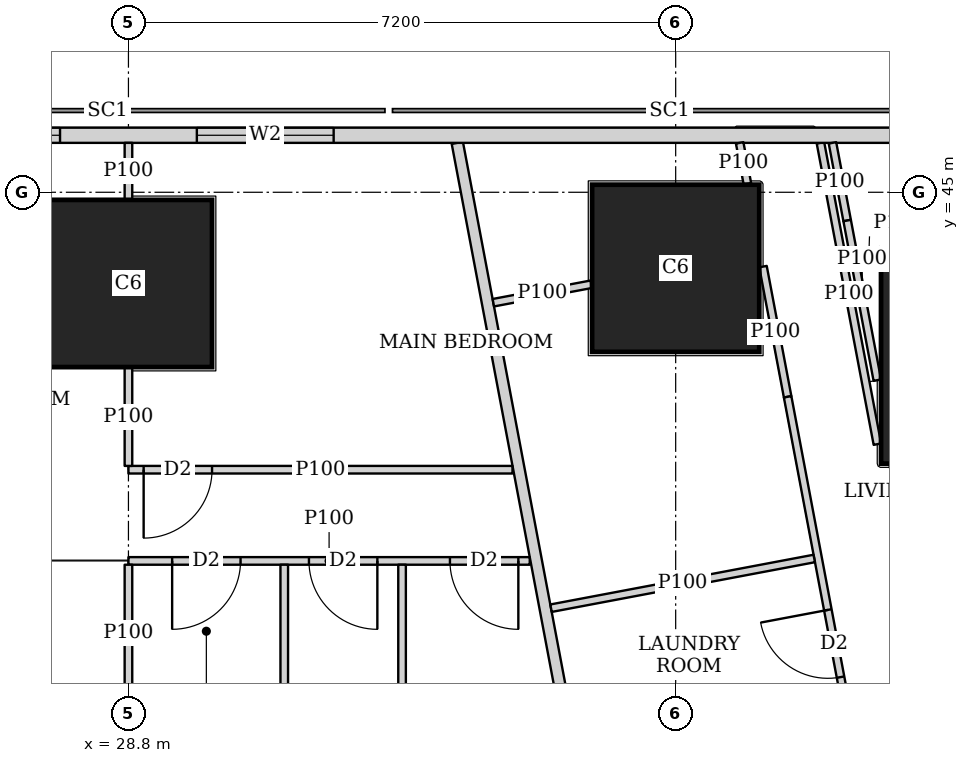
"""IFC4 building model, lengths in metres.
Left out: names, types, materials, properties, quantities, classifications, styles, units other than length and angle.
Written with IfcOpenShell. Run it as: python <this file> out.ifc"""

import sys

from ifc_helpers import new_model, si_unit, direction, frame, frame_2d, origin, origin_2d, place, context, subcontext, project, spatial, rectangle, extrude, element, fill, save


model = new_model("IFC4")
c1 = context("Model", 3, precision=1e-05, world=origin(), true_north=direction((0.0, 1.0)))
c2 = subcontext(c1, "Body", "Model", "MODEL_VIEW")
j1 = project(units=[si_unit("LENGTHUNIT", "METRE"), si_unit("PLANEANGLEUNIT", "RADIAN")], contexts=[c1])
p1 = place(None, origin())
s1 = spatial("IfcSite", under=j1, at=p1, CompositionType="ELEMENT")
p2 = place(p1, origin())
s2 = spatial("IfcBuilding", under=s1, at=p2, CompositionType="ELEMENT")
p3 = place(p2, frame((0.0, 0.0, 89.15)))
s3 = spatial("IfcBuildingStorey", under=s2, at=p3, CompositionType="ELEMENT", Elevation=89.15)
p4 = place(p3, frame((40.102, 42.83, 0.0), z_axis=(0.0, 0.0, 1.0), x_axis=(1.0, 0.0, 0.0)))
e1 = element("IfcColumn", 1, at=p4, inside=s3, PredefinedType="COLUMN", context=c2, shape_type="SweptSolid", body=[
    extrude(rectangle(XDim=2.8, YDim=2.8, at=origin_2d()), origin(), (0.0, 0.0, 1.0), 3.75),
])
for number, where, z_axis, x_axis in (
    (2, (28.8, 43.8, 0.0), (0.0, 0.0, 1.0), (1.0, 0.0, 0.0)),
    (3, (36.0, 44.0, 0.0), (0.0, 0.0, 1.0), (1.0, 0.0, 0.0)),
):
    element("IfcColumn", number, at=place(p3, frame(where, z_axis=z_axis, x_axis=x_axis)), inside=s3, PredefinedType="COLUMN", context=c2, shape_type="SweptSolid", body=[
        extrude(rectangle(XDim=2.2, YDim=2.2, at=origin_2d()), origin(), (0.0, 0.0, 1.0), 3.75),
    ])
p5 = place(p3, frame((40.106, 45.75, 0.0), z_axis=(0.0, 0.0, 1.0), x_axis=(-1.0, 0.0, 0.0)))
e4 = element("IfcWall", 4, at=p5, inside=s3, PredefinedType="SOLIDWALL", context=c2, shape_type="SweptSolid", body=[
    extrude(rectangle(XDim=37.943, YDim=0.2, at=frame_2d((18.971, 0.0))), origin(), (0.0, 0.0, 1.0), 3.5),
])
p6 = place(p5, frame((8.606, 0.0, 0.9)))
e5 = element("IfcOpeningElement", 5, at=p6, cuts=e4, PredefinedType="OPENING", context=c2, shape_type="SweptSolid", body=[
    extrude(rectangle(XDim=1.8, YDim=1.5, at=frame_2d((0.9, 0.75))), frame((0.0, 0.11, 0.0), z_axis=(0.0, -1.0, 0.0), x_axis=(1.0, 0.0, 0.0)), (0.0, 0.0, 1.0), 0.22),
])
p7 = place(p5, frame((12.206, 0.0, 0.9)))
e6 = element("IfcOpeningElement", 6, at=p7, cuts=e4, PredefinedType="OPENING", context=c2, shape_type="SweptSolid", body=[
    extrude(rectangle(XDim=1.8, YDim=1.5, at=frame_2d((0.9, 0.75))), frame((0.0, 0.11, 0.0), z_axis=(0.0, -1.0, 0.0), x_axis=(1.0, 0.0, 0.0)), (0.0, 0.0, 1.0), 0.22),
])
p8 = place(p5, frame((15.806, 0.0, 0.9)))
e7 = element("IfcOpeningElement", 7, at=p8, cuts=e4, PredefinedType="OPENING", context=c2, shape_type="SweptSolid", body=[
    extrude(rectangle(XDim=1.8, YDim=1.5, at=frame_2d((0.9, 0.75))), frame((0.0, 0.11, 0.0), z_axis=(0.0, -1.0, 0.0), x_axis=(1.0, 0.0, 0.0)), (0.0, 0.0, 1.0), 0.22),
])
p9 = place(p5, frame((19.406, 0.0, 0.9)))
e8 = element("IfcOpeningElement", 8, at=p9, cuts=e4, PredefinedType="OPENING", context=c2, shape_type="SweptSolid", body=[
    extrude(rectangle(XDim=1.8, YDim=1.5, at=frame_2d((0.9, 0.75))), frame((0.0, 0.11, 0.0), z_axis=(0.0, -1.0, 0.0), x_axis=(1.0, 0.0, 0.0)), (0.0, 0.0, 1.0), 0.22),
])
p10 = place(p5, frame((23.006, 0.0, 0.9)))
e9 = element("IfcOpeningElement", 9, at=p10, cuts=e4, PredefinedType="OPENING", context=c2, shape_type="SweptSolid", body=[
    extrude(rectangle(XDim=1.8, YDim=1.5, at=frame_2d((0.9, 0.75))), frame((0.0, 0.11, 0.0), z_axis=(0.0, -1.0, 0.0), x_axis=(1.0, 0.0, 0.0)), (0.0, 0.0, 1.0), 0.22),
])
p11 = place(p5, frame((26.606, 0.0, 0.9)))
e10 = element("IfcOpeningElement", 10, at=p11, cuts=e4, PredefinedType="OPENING", context=c2, shape_type="SweptSolid", body=[
    extrude(rectangle(XDim=1.8, YDim=1.5, at=frame_2d((0.9, 0.75))), frame((0.0, 0.11, 0.0), z_axis=(0.0, -1.0, 0.0), x_axis=(1.0, 0.0, 0.0)), (0.0, 0.0, 1.0), 0.22),
])
p12 = place(p3, frame((33.127, 45.65, 0.0), z_axis=(0.0, 0.0, 1.0), x_axis=(0.185598547723, -0.98262565562, 0.0)))
e11 = element("IfcWall", 11, at=p12, inside=s3, PredefinedType="SOLIDWALL", context=c2, shape_type="SweptSolid", body=[
    extrude(rectangle(XDim=47.118, YDim=0.15, at=frame_2d((23.559, 0.0))), origin(), (0.0, 0.0, 1.0), 2.2),
])
p13 = place(p12, frame((15.285, 0.0, 0.0)))
e12 = element("IfcOpeningElement", 12, at=p13, cuts=e11, PredefinedType="OPENING", context=c2, shape_type="SweptSolid", body=[
    extrude(rectangle(XDim=1.0, YDim=2.1, at=frame_2d((0.5, 1.05))), frame((0.0, 0.085, 0.0), z_axis=(0.0, -1.0, 0.0), x_axis=(1.0, 0.0, 0.0)), (0.0, 0.0, 1.0), 0.17),
])
p14 = place(p12, frame((19.102, 0.0, 0.0)))
e13 = element("IfcOpeningElement", 13, at=p14, cuts=e11, PredefinedType="OPENING", context=c2, shape_type="SweptSolid", body=[
    extrude(rectangle(XDim=1.0, YDim=2.1, at=frame_2d((0.5, 1.05))), frame((0.0, 0.085, 0.0), z_axis=(0.0, -1.0, 0.0), x_axis=(1.0, 0.0, 0.0)), (0.0, 0.0, 1.0), 0.17),
])
p15 = place(p12, frame((33.88, 0.0, 0.0)))
e14 = element("IfcOpeningElement", 14, at=p15, cuts=e11, PredefinedType="OPENING", context=c2, shape_type="SweptSolid", body=[
    extrude(rectangle(XDim=1.0, YDim=2.1, at=frame_2d((0.5, 1.05))), frame((0.0, 0.085, 0.0), z_axis=(0.0, -1.0, 0.0), x_axis=(1.0, 0.0, 0.0)), (0.0, 0.0, 1.0), 0.17),
])
p16 = place(p3, frame((38.654, 41.686, 0.0), z_axis=(0.0, 0.0, 1.0), x_axis=(-0.185676896978, 0.982610853761, 0.0)))
e15 = element("IfcWall", 15, at=p16, inside=s3, PredefinedType="PARTITIONING", context=c2, shape_type="SweptSolid", body=[
    extrude(rectangle(XDim=4.034, YDim=0.1, at=frame_2d((2.017, 0.0))), origin(), (0.0, 0.0, 1.0), 2.05),
])
p17 = place(p3, frame((38.063, 45.65, 0.0), z_axis=(0.0, 0.0, 1.0), x_axis=(0.185677287841, -0.982610779902, 0.0)))
e16 = element("IfcWall", 16, at=p17, inside=s3, PredefinedType="PARTITIONING", context=c2, shape_type="SweptSolid", body=[
    extrude(rectangle(XDim=1.04, YDim=0.1, at=frame_2d((0.52, 0.0))), origin(), (0.0, 0.0, 1.0), 3.5),
])
p18 = place(p3, frame((38.256, 44.628, 0.0), z_axis=(0.0, 0.0, 1.0), x_axis=(0.185757524649, -0.982595614704, 0.0)))
e17 = element("IfcWall", 17, at=p18, inside=s3, PredefinedType="PARTITIONING", context=c2, shape_type="SweptSolid", body=[
    extrude(rectangle(XDim=2.137, YDim=0.1, at=frame_2d((1.068, 0.0))), origin(), (0.0, 0.0, 1.0), 2.05),
])
p19 = place(p3, frame((38.862, 41.42, 0.0), z_axis=(0.0, 0.0, 1.0), x_axis=(0.185574815416, -0.982630137887, 0.0)))
e18 = element("IfcWall", 18, at=p19, inside=s3, PredefinedType="PARTITIONING", context=c2, shape_type="SweptSolid", body=[
    extrude(rectangle(XDim=8.605, YDim=0.1, at=frame_2d((4.303, 0.0))), origin(), (0.0, 0.0, 1.0), 3.5),
])
p20 = place(p19, frame((7.555, 0.0, 0.0)))
e19 = element("IfcOpeningElement", 19, at=p20, cuts=e18, PredefinedType="OPENING", context=c2, shape_type="SweptSolid", body=[
    extrude(rectangle(XDim=0.9, YDim=2.1, at=frame_2d((0.45, 1.05))), frame((0.0, 0.06, 0.0), z_axis=(0.0, -1.0, 0.0), x_axis=(1.0, 0.0, 0.0)), (0.0, 0.0, 1.0), 0.12),
])
p21 = place(p19, frame((3.579, 0.0, 0.0)))
e20 = element("IfcOpeningElement", 20, at=p21, cuts=e18, PredefinedType="OPENING", context=c2, shape_type="SweptSolid", body=[
    extrude(rectangle(XDim=0.9, YDim=2.1, at=frame_2d((0.45, 1.05))), frame((0.0, 0.06, 0.0), z_axis=(0.0, -1.0, 0.0), x_axis=(1.0, 0.0, 0.0)), (0.0, 0.0, 1.0), 0.12),
])
p22 = place(p3, frame((36.842, 45.65, 0.0), z_axis=(0.0, 0.0, 1.0), x_axis=(0.185764109712, -0.98259436979, 0.0)))
e21 = element("IfcWall", 21, at=p22, inside=s3, PredefinedType="PARTITIONING", context=c2, shape_type="SweptSolid", body=[
    extrude(rectangle(XDim=0.549, YDim=0.1, at=frame_2d((0.275, 0.0))), origin(), (0.0, 0.0, 1.0), 3.5),
])
p23 = place(p3, frame((37.149, 44.022, 0.0), z_axis=(0.0, 0.0, 1.0), x_axis=(0.185844162065, -0.982579232137, 0.0)))
e22 = element("IfcWall", 22, at=p23, inside=s3, PredefinedType="PARTITIONING", context=c2, shape_type="SweptSolid", body=[
    extrude(rectangle(XDim=1.743, YDim=0.1, at=frame_2d((0.872, 0.0))), origin(), (0.0, 0.0, 1.0), 2.05),
])
p24 = place(p3, frame((37.473, 42.309, 0.0), z_axis=(0.0, 0.0, 1.0), x_axis=(0.185491912953, -0.982645790827, 0.0)))
e23 = element("IfcWall", 23, at=p24, inside=s3, PredefinedType="PARTITIONING", context=c2, shape_type="SweptSolid", body=[
    extrude(rectangle(XDim=9.737, YDim=0.1, at=frame_2d((4.869, 0.0))), origin(), (0.0, 0.0, 1.0), 3.5),
])
p25 = place(p24, frame((8.312, 0.0, 0.0)))
e24 = element("IfcOpeningElement", 24, at=p25, cuts=e23, PredefinedType="OPENING", context=c2, shape_type="SweptSolid", body=[
    extrude(rectangle(XDim=0.9, YDim=2.1, at=frame_2d((0.45, 1.05))), frame((0.0, 0.06, 0.0), z_axis=(0.0, -1.0, 0.0), x_axis=(1.0, 0.0, 0.0)), (0.0, 0.0, 1.0), 0.12),
])
p26 = place(p24, frame((2.853, 0.0, 0.0)))
e25 = element("IfcOpeningElement", 25, at=p26, cuts=e23, PredefinedType="OPENING", context=c2, shape_type="SweptSolid", body=[
    extrude(rectangle(XDim=0.9, YDim=2.1, at=frame_2d((0.45, 1.05))), frame((0.0, 0.06, 0.0), z_axis=(0.0, -1.0, 0.0), x_axis=(1.0, 0.0, 0.0)), (0.0, 0.0, 1.0), 0.12),
])
p27 = place(p24, frame((5.644, 0.0, 0.0)))
e26 = element("IfcOpeningElement", 26, at=p27, cuts=e23, PredefinedType="OPENING", context=c2, shape_type="SweptSolid", body=[
    extrude(rectangle(XDim=0.9, YDim=2.1, at=frame_2d((0.45, 1.05))), frame((0.0, 0.06, 0.0), z_axis=(0.0, -1.0, 0.0), x_axis=(1.0, 0.0, 0.0)), (0.0, 0.0, 1.0), 0.12),
])
p28 = place(p3, frame((38.692, 44.23, 0.0), z_axis=(0.0, 0.0, 1.0), x_axis=(-0.982944840311, -0.183900627803, 0.0)))
e27 = element("IfcWall", 27, at=p28, inside=s3, PredefinedType="PARTITIONING", context=c2, shape_type="SweptSolid", body=[
    extrude(rectangle(XDim=0.304, YDim=0.1, at=frame_2d((0.152, 0.0))), origin(), (0.0, 0.0, 1.0), 2.05),
])
p29 = place(p3, frame((34.89, 43.79, 0.0), z_axis=(0.0, 0.0, 1.0), x_axis=(-0.982696831521, -0.185221319826, 0.0)))
e28 = element("IfcWall", 28, at=p29, inside=s3, PredefinedType="PARTITIONING", context=c2, shape_type="SweptSolid", body=[
    extrude(rectangle(XDim=1.312, YDim=0.1, at=frame_2d((0.656, 0.0))), origin(), (0.0, 0.0, 1.0), 2.05),
])
p30 = place(p3, frame((37.823, 40.182, 0.0), z_axis=(0.0, 0.0, 1.0), x_axis=(-0.98263926043, -0.185526504472, 0.0)))
e29 = element("IfcWall", 29, at=p30, inside=s3, PredefinedType="PARTITIONING", context=c2, shape_type="SweptSolid", body=[
    extrude(rectangle(XDim=3.524, YDim=0.1, at=frame_2d((1.762, 0.0))), origin(), (0.0, 0.0, 1.0), 3.5),
])
p31 = place(p3, frame((28.8, 41.35, 0.0), z_axis=(0.0, 0.0, 1.0), x_axis=(1.0, 0.0, 0.0)))
e30 = element("IfcWall", 30, at=p31, inside=s3, PredefinedType="PARTITIONING", context=c2, shape_type="SweptSolid", body=[
    extrude(rectangle(XDim=5.053, YDim=0.1, at=frame_2d((2.526, 0.0))), origin(), (0.0, 0.0, 1.0), 3.5),
])
p32 = place(p31, frame((0.2, 0.0, 0.0)))
e31 = element("IfcOpeningElement", 31, at=p32, cuts=e30, PredefinedType="OPENING", context=c2, shape_type="SweptSolid", body=[
    extrude(rectangle(XDim=0.9, YDim=2.1, at=frame_2d((0.45, 1.05))), frame((0.0, 0.06, 0.0), z_axis=(0.0, -1.0, 0.0), x_axis=(1.0, 0.0, 0.0)), (0.0, 0.0, 1.0), 0.12),
])
p33 = place(p3, frame((28.8, 40.15, 0.0), z_axis=(0.0, 0.0, 1.0), x_axis=(1.0, 0.0, 0.0)))
e32 = element("IfcWall", 32, at=p33, inside=s3, PredefinedType="PARTITIONING", context=c2, shape_type="SweptSolid", body=[
    extrude(rectangle(XDim=5.28, YDim=0.1, at=frame_2d((2.64, 0.0))), origin(), (0.0, 0.0, 1.0), 3.5),
])
p34 = place(p33, frame((0.575, 0.0, 0.0)))
e33 = element("IfcOpeningElement", 33, at=p34, cuts=e32, PredefinedType="OPENING", context=c2, shape_type="SweptSolid", body=[
    extrude(rectangle(XDim=0.9, YDim=2.1, at=frame_2d((0.45, 1.05))), frame((0.0, 0.06, 0.0), z_axis=(0.0, -1.0, 0.0), x_axis=(1.0, 0.0, 0.0)), (0.0, 0.0, 1.0), 0.12),
])
p35 = place(p33, frame((4.23, 0.0, 0.0)))
e34 = element("IfcOpeningElement", 34, at=p35, cuts=e32, PredefinedType="OPENING", context=c2, shape_type="SweptSolid", body=[
    extrude(rectangle(XDim=0.9, YDim=2.1, at=frame_2d((0.45, 1.05))), frame((0.0, 0.06, 0.0), z_axis=(0.0, -1.0, 0.0), x_axis=(1.0, 0.0, 0.0)), (0.0, 0.0, 1.0), 0.12),
])
p36 = place(p33, frame((2.375, 0.0, 0.0)))
e35 = element("IfcOpeningElement", 35, at=p36, cuts=e32, PredefinedType="OPENING", context=c2, shape_type="SweptSolid", body=[
    extrude(rectangle(XDim=0.9, YDim=2.1, at=frame_2d((0.45, 1.05))), frame((0.0, 0.06, 0.0), z_axis=(0.0, -1.0, 0.0), x_axis=(1.0, 0.0, 0.0)), (0.0, 0.0, 1.0), 0.12),
])
p37 = place(p3, frame((28.8, 41.4, 0.0), z_axis=(0.0, 0.0, 1.0), x_axis=(0.0, 1.0, 0.0)))
e36 = element("IfcWall", 36, at=p37, inside=s3, PredefinedType="PARTITIONING", context=c2, shape_type="SweptSolid", body=[
    extrude(rectangle(XDim=1.299, YDim=0.1, at=frame_2d((0.649, 0.0))), origin(), (0.0, 0.0, 1.0), 3.5),
])
p38 = place(p3, frame((28.8, 44.901, 0.0), z_axis=(0.0, 0.0, 1.0), x_axis=(0.0, 1.0, 0.0)))
e37 = element("IfcWall", 37, at=p38, inside=s3, PredefinedType="PARTITIONING", context=c2, shape_type="SweptSolid", body=[
    extrude(rectangle(XDim=0.749, YDim=0.1, at=frame_2d((0.375, 0.0))), origin(), (0.0, 0.0, 1.0), 3.5),
])
p39 = place(p3, frame((28.8, 38.301, 0.0), z_axis=(0.0, 0.0, 1.0), x_axis=(0.0, 1.0, 0.0)))
e38 = element("IfcWall", 38, at=p39, inside=s3, PredefinedType="PARTITIONING", context=c2, shape_type="SweptSolid", body=[
    extrude(rectangle(XDim=1.799, YDim=0.1, at=frame_2d((0.899, 0.0))), origin(), (0.0, 0.0, 1.0), 3.5),
])
for number, where, z_axis, x_axis in (
    (39, (32.4, 36.575, 0.0), (0.0, 0.0, 1.0), (0.0, 1.0, 0.0)),
    (40, (30.85, 36.575, 0.0), (0.0, 0.0, 1.0), (0.0, 1.0, 0.0)),
):
    element("IfcWall", number, at=place(p3, frame(where, z_axis=z_axis, x_axis=x_axis)), inside=s3, PredefinedType="PARTITIONING", context=c2, shape_type="SweptSolid", body=[
        extrude(rectangle(XDim=3.525, YDim=0.1, at=frame_2d((1.763, 0.0))), origin(), (0.0, 0.0, 1.0), 3.5),
    ])
p40 = place(p6, origin())
e41 = element("IfcWindow", 41, at=p40, inside=s3, PartitioningType="SINGLE_PANEL", PredefinedType="WINDOW", context=c2, shape_type="SweptSolid", body=[
    extrude(rectangle(XDim=1.8, YDim=1.5, at=frame_2d((0.9, 0.75))), frame((0.0, 0.03, 0.0), z_axis=(0.0, -1.0, 0.0), x_axis=(1.0, 0.0, 0.0)), (0.0, 0.0, 1.0), 0.06),
])
fill(e5, e41)
p41 = place(p7, origin())
e42 = element("IfcWindow", 42, at=p41, inside=s3, PartitioningType="SINGLE_PANEL", PredefinedType="WINDOW", context=c2, shape_type="SweptSolid", body=[
    extrude(rectangle(XDim=1.8, YDim=1.5, at=frame_2d((0.9, 0.75))), frame((0.0, 0.03, 0.0), z_axis=(0.0, -1.0, 0.0), x_axis=(1.0, 0.0, 0.0)), (0.0, 0.0, 1.0), 0.06),
])
fill(e6, e42)
p42 = place(p26, origin())
e43 = element("IfcDoor", 43, at=p42, inside=s3, OperationType="SINGLE_SWING_RIGHT", PredefinedType="DOOR", context=c2, shape_type="SweptSolid", body=[
    extrude(rectangle(XDim=0.9, YDim=2.1, at=frame_2d((0.45, 1.05))), frame((0.0, 0.025, 0.0), z_axis=(0.0, -1.0, 0.0), x_axis=(1.0, 0.0, 0.0)), (0.0, 0.0, 1.0), 0.05),
])
fill(e25, e43)
p43 = place(p32, origin())
e44 = element("IfcDoor", 44, at=p43, inside=s3, OperationType="SINGLE_SWING_RIGHT", PredefinedType="DOOR", context=c2, shape_type="SweptSolid", body=[
    extrude(rectangle(XDim=0.9, YDim=2.1, at=frame_2d((0.45, 1.05))), frame((0.0, 0.025, 0.0), z_axis=(0.0, -1.0, 0.0), x_axis=(1.0, 0.0, 0.0)), (0.0, 0.0, 1.0), 0.05),
])
fill(e31, e44)
p44 = place(p34, origin())
e45 = element("IfcDoor", 45, at=p44, inside=s3, OperationType="SINGLE_SWING_RIGHT", PredefinedType="DOOR", context=c2, shape_type="SweptSolid", body=[
    extrude(rectangle(XDim=0.9, YDim=2.1, at=frame_2d((0.45, 1.05))), frame((0.0, 0.025, 0.0), z_axis=(0.0, -1.0, 0.0), x_axis=(1.0, 0.0, 0.0)), (0.0, 0.0, 1.0), 0.05),
])
fill(e33, e45)
p45 = place(p35, origin())
e46 = element("IfcDoor", 46, at=p45, inside=s3, OperationType="SINGLE_SWING_LEFT", PredefinedType="DOOR", context=c2, shape_type="SweptSolid", body=[
    extrude(rectangle(XDim=0.9, YDim=2.1, at=frame_2d((0.45, 1.05))), frame((0.0, 0.025, 0.0), z_axis=(0.0, -1.0, 0.0), x_axis=(1.0, 0.0, 0.0)), (0.0, 0.0, 1.0), 0.05),
])
fill(e34, e46)
p46 = place(p36, origin())
e47 = element("IfcDoor", 47, at=p46, inside=s3, OperationType="SINGLE_SWING_LEFT", PredefinedType="DOOR", context=c2, shape_type="SweptSolid", body=[
    extrude(rectangle(XDim=0.9, YDim=2.1, at=frame_2d((0.45, 1.05))), frame((0.0, 0.025, 0.0), z_axis=(0.0, -1.0, 0.0), x_axis=(1.0, 0.0, 0.0)), (0.0, 0.0, 1.0), 0.05),
])
fill(e35, e47)
save(model, sys.argv[1])
